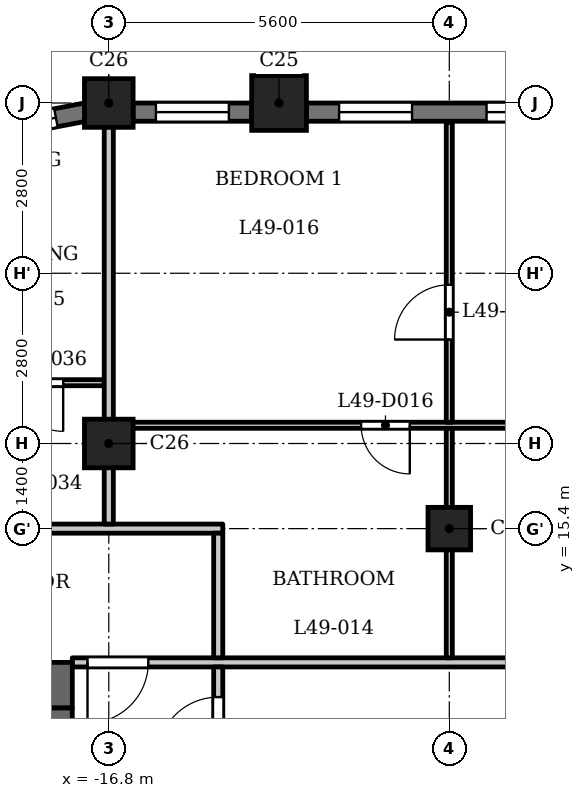
"""IFC4 building model, lengths in metres.
Left out: names, types, materials, properties, quantities, classifications, styles, units other than length and angle.
Written with IfcOpenShell. Run it as: python <this file> out.ifc"""

import sys

from ifc_helpers import new_model, si_unit, direction, frame, frame_2d, origin, origin_2d, place, context, subcontext, project, spatial, rectangle, extrude, element, fill, save


model = new_model("IFC4")
c1 = context("Model", 3, precision=1e-05, world=origin(), true_north=direction((0.0, 1.0)))
c2 = subcontext(c1, "Body", "Model", "MODEL_VIEW")
j1 = project(units=[si_unit("LENGTHUNIT", "METRE"), si_unit("PLANEANGLEUNIT", "RADIAN")], contexts=[c1])
p1 = place(None, origin())
s1 = spatial("IfcSite", under=j1, at=p1, CompositionType="ELEMENT")
p2 = place(p1, origin())
s2 = spatial("IfcBuilding", under=s1, at=p2, CompositionType="ELEMENT")
p3 = place(p2, frame((0.0, 0.0, 192.4)))
s3 = spatial("IfcBuildingStorey", under=s2, at=p3, CompositionType="ELEMENT", Elevation=192.4)
p4 = place(p3, frame((-14.0, 22.4, 0.0), z_axis=(0.0, 0.0, 1.0), x_axis=(1.0, 0.0, 0.0)))
e1 = element("IfcColumn", 1, at=p4, inside=s3, PredefinedType="COLUMN", context=c2, shape_type="SweptSolid", body=[
    extrude(rectangle(XDim=0.9, YDim=0.9, at=origin_2d()), origin(), (0.0, 0.0, 1.0), 3.5),
])
for number, where, z_axis, x_axis in (
    (2, (-16.8, 16.8, 0.0), (0.0, 0.0, 1.0), (1.0, 0.0, 0.0)),
    (3, (-16.8, 22.4, 0.0), (0.0, 0.0, 1.0), (1.0, 0.0, 0.0)),
):
    element("IfcColumn", number, at=place(p3, frame(where, z_axis=z_axis, x_axis=x_axis)), inside=s3, PredefinedType="COLUMN", context=c2, shape_type="SweptSolid", body=[
        extrude(rectangle(XDim=0.8, YDim=0.8, at=origin_2d()), origin(), (0.0, 0.0, 1.0), 3.5),
    ])
p5 = place(p3, frame((-11.2, 15.4, 0.0), z_axis=(0.0, 0.0, 1.0), x_axis=(1.0, 0.0, 0.0)))
e4 = element("IfcColumn", 4, at=p5, inside=s3, PredefinedType="COLUMN", context=c2, shape_type="SweptSolid", body=[
    extrude(rectangle(XDim=0.7, YDim=0.7, at=origin_2d()), origin(), (0.0, 0.0, 1.0), 3.5),
])
p6 = place(p3, frame((-8.85, 22.25, 0.0), z_axis=(0.0, 0.0, 1.0), x_axis=(-1.0, 0.0, 0.0)))
e5 = element("IfcWall", 5, at=p6, inside=s3, PredefinedType="SOLIDWALL", context=c2, shape_type="SweptSolid", body=[
    extrude(rectangle(XDim=4.7, YDim=0.3, at=frame_2d((2.35, 0.0))), origin(), (0.0, 0.0, 1.0), 2.5),
])
p7 = place(p6, frame((0.538, 0.0, 0.6)))
e6 = element("IfcOpeningElement", 6, at=p7, cuts=e5, PredefinedType="OPENING", context=c2, shape_type="SweptSolid", body=[
    extrude(rectangle(XDim=1.2, YDim=1.55, at=frame_2d((0.6, 0.775))), frame((0.0, 0.16, 0.0), z_axis=(0.0, -1.0, 0.0), x_axis=(1.0, 0.0, 0.0)), (0.0, 0.0, 1.0), 0.32),
])
p8 = place(p6, frame((2.962, 0.0, 0.6)))
e7 = element("IfcOpeningElement", 7, at=p8, cuts=e5, PredefinedType="OPENING", context=c2, shape_type="SweptSolid", body=[
    extrude(rectangle(XDim=1.2, YDim=1.55, at=frame_2d((0.6, 0.775))), frame((0.0, 0.16, 0.0), z_axis=(0.0, -1.0, 0.0), x_axis=(1.0, 0.0, 0.0)), (0.0, 0.0, 1.0), 0.32),
])
p9 = place(p3, frame((-14.45, 22.25, 0.0), z_axis=(0.0, 0.0, 1.0), x_axis=(-1.0, 0.0, 0.0)))
e8 = element("IfcWall", 8, at=p9, inside=s3, PredefinedType="SOLIDWALL", context=c2, shape_type="SweptSolid", body=[
    extrude(rectangle(XDim=1.95, YDim=0.3, at=frame_2d((0.975, 0.0))), origin(), (0.0, 0.0, 1.0), 2.5),
])
p10 = place(p9, frame((0.375, 0.0, 0.6)))
e9 = element("IfcOpeningElement", 9, at=p10, cuts=e8, PredefinedType="OPENING", context=c2, shape_type="SweptSolid", body=[
    extrude(rectangle(XDim=1.2, YDim=1.55, at=frame_2d((0.6, 0.775))), frame((0.0, 0.16, 0.0), z_axis=(0.0, -1.0, 0.0), x_axis=(1.0, 0.0, 0.0)), (0.0, 0.0, 1.0), 0.32),
])
p11 = place(p3, frame((-17.179, 22.251, 0.0), z_axis=(0.0, 0.0, 1.0), x_axis=(-0.98230529033, -0.187286722942, 0.0)))
e10 = element("IfcWall", 10, at=p11, inside=s3, PredefinedType="SOLIDWALL", context=c2, shape_type="SweptSolid", body=[
    extrude(rectangle(XDim=1.799, YDim=0.3, at=frame_2d((0.899, 0.0))), origin(), (0.0, 0.0, 1.0), 2.5),
])
p12 = place(p11, frame((0.5, 0.0, 0.6)))
e11 = element("IfcOpeningElement", 11, at=p12, cuts=e10, PredefinedType="OPENING", context=c2, shape_type="SweptSolid", body=[
    extrude(rectangle(XDim=0.8, YDim=1.55, at=frame_2d((0.4, 0.775))), frame((0.0, 0.16, 0.0), z_axis=(0.0, -1.0, 0.0), x_axis=(1.0, 0.0, 0.0)), (0.0, 0.0, 1.0), 0.32),
])
p13 = place(p3, frame((-17.4, 12.825, 0.0), z_axis=(0.0, 0.0, 1.0), x_axis=(-1.0, 0.0, 0.0)))
e12 = element("IfcWall", 12, at=p13, inside=s3, PredefinedType="SHEAR", context=c2, shape_type="SweptSolid", body=[
    extrude(rectangle(XDim=7.6, YDim=0.75, at=frame_2d((3.8, 0.0))), origin(), (0.0, 0.0, 1.0), 3.2),
])
p14 = place(p3, frame((-17.6, -12.45, 0.0), z_axis=(0.0, 0.0, 1.0), x_axis=(0.0, 1.0, 0.0)))
e13 = element("IfcWall", 13, at=p14, inside=s3, PredefinedType="SHEAR", context=c2, shape_type="SweptSolid", body=[
    extrude(rectangle(XDim=24.9, YDim=0.4, at=frame_2d((12.45, 0.0))), origin(), (0.0, 0.0, 1.0), 3.2),
])
p15 = place(p14, frame((6.325, 0.0, 0.0)))
e14 = element("IfcOpeningElement", 14, at=p15, cuts=e13, PredefinedType="OPENING", context=c2, shape_type="SweptSolid", body=[
    extrude(rectangle(XDim=0.9, YDim=2.1, at=frame_2d((0.45, 1.05))), frame((0.0, 0.21, 0.0), z_axis=(0.0, -1.0, 0.0), x_axis=(1.0, 0.0, 0.0)), (0.0, 0.0, 1.0), 0.42),
])
p16 = place(p14, frame((9.925, 0.0, 0.0)))
e15 = element("IfcOpeningElement", 15, at=p16, cuts=e13, PredefinedType="OPENING", context=c2, shape_type="SweptSolid", body=[
    extrude(rectangle(XDim=0.9, YDim=2.1, at=frame_2d((0.45, 1.05))), frame((0.0, 0.21, 0.0), z_axis=(0.0, -1.0, 0.0), x_axis=(1.0, 0.0, 0.0)), (0.0, 0.0, 1.0), 0.42),
])
p17 = place(p14, frame((15.6, 0.0, 0.0)))
e16 = element("IfcOpeningElement", 16, at=p17, cuts=e13, PredefinedType="OPENING", context=c2, shape_type="SweptSolid", body=[
    extrude(rectangle(XDim=1.1, YDim=2.1, at=frame_2d((0.55, 1.05))), frame((0.0, 0.21, 0.0), z_axis=(0.0, -1.0, 0.0), x_axis=(1.0, 0.0, 0.0)), (0.0, 0.0, 1.0), 0.42),
])
p18 = place(p14, frame((18.0, 0.0, 0.0)))
e17 = element("IfcOpeningElement", 17, at=p18, cuts=e13, PredefinedType="OPENING", context=c2, shape_type="SweptSolid", body=[
    extrude(rectangle(XDim=1.1, YDim=2.1, at=frame_2d((0.55, 1.05))), frame((0.0, 0.21, 0.0), z_axis=(0.0, -1.0, 0.0), x_axis=(1.0, 0.0, 0.0)), (0.0, 0.0, 1.0), 0.42),
])
p19 = place(p14, frame((23.025, 0.0, 0.0)))
e18 = element("IfcOpeningElement", 18, at=p19, cuts=e13, PredefinedType="OPENING", context=c2, shape_type="SweptSolid", body=[
    extrude(rectangle(XDim=1.1, YDim=2.1, at=frame_2d((0.55, 1.05))), frame((0.0, 0.21, 0.0), z_axis=(0.0, -1.0, 0.0), x_axis=(1.0, 0.0, 0.0)), (0.0, 0.0, 1.0), 0.42),
])
p20 = place(p14, frame((0.775, 0.0, 0.0)))
e19 = element("IfcOpeningElement", 19, at=p20, cuts=e13, PredefinedType="OPENING", context=c2, shape_type="SweptSolid", body=[
    extrude(rectangle(XDim=1.1, YDim=2.1, at=frame_2d((0.55, 1.05))), frame((0.0, 0.21, 0.0), z_axis=(0.0, -1.0, 0.0), x_axis=(1.0, 0.0, 0.0)), (0.0, 0.0, 1.0), 0.42),
])
p21 = place(p14, frame((12.925, 0.0, 0.0)))
e20 = element("IfcOpeningElement", 20, at=p21, cuts=e13, PredefinedType="OPENING", context=c2, shape_type="SweptSolid", body=[
    extrude(rectangle(XDim=1.8, YDim=2.1, at=frame_2d((0.9, 1.05))), frame((0.0, 0.21, 0.0), z_axis=(0.0, -1.0, 0.0), x_axis=(1.0, 0.0, 0.0)), (0.0, 0.0, 1.0), 0.42),
])
p22 = place(p3, frame((-17.4, 13.2, 0.0), z_axis=(0.0, 0.0, 1.0), x_axis=(1.0, 0.0, 0.0)))
e21 = element("IfcWall", 21, at=p22, inside=s3, PredefinedType="PARTITIONING", context=c2, shape_type="SweptSolid", body=[
    extrude(rectangle(XDim=34.8, YDim=0.15, at=frame_2d((17.4, 0.0))), origin(), (0.0, 0.0, 1.0), 3.2),
])
p23 = place(p22, frame((0.25, 0.0, 0.0)))
e22 = element("IfcOpeningElement", 22, at=p23, cuts=e21, PredefinedType="OPENING", context=c2, shape_type="SweptSolid", body=[
    extrude(rectangle(XDim=1.0, YDim=2.1, at=frame_2d((0.5, 1.05))), frame((0.0, 0.085, 0.0), z_axis=(0.0, -1.0, 0.0), x_axis=(1.0, 0.0, 0.0)), (0.0, 0.0, 1.0), 0.17),
])
p24 = place(p22, frame((33.65, 0.0, 0.0)))
e23 = element("IfcOpeningElement", 23, at=p24, cuts=e21, PredefinedType="OPENING", context=c2, shape_type="SweptSolid", body=[
    extrude(rectangle(XDim=1.0, YDim=2.1, at=frame_2d((0.5, 1.05))), frame((0.0, 0.085, 0.0), z_axis=(0.0, -1.0, 0.0), x_axis=(1.0, 0.0, 0.0)), (0.0, 0.0, 1.0), 0.17),
])
p25 = place(p22, frame((10.15, 0.0, 0.0)))
e24 = element("IfcOpeningElement", 24, at=p25, cuts=e21, PredefinedType="OPENING", context=c2, shape_type="SweptSolid", body=[
    extrude(rectangle(XDim=1.0, YDim=2.1, at=frame_2d((0.5, 1.05))), frame((0.0, 0.085, 0.0), z_axis=(0.0, -1.0, 0.0), x_axis=(1.0, 0.0, 0.0)), (0.0, 0.0, 1.0), 0.17),
])
p26 = place(p22, frame((13.55, 0.0, 0.0)))
e25 = element("IfcOpeningElement", 25, at=p26, cuts=e21, PredefinedType="OPENING", context=c2, shape_type="SweptSolid", body=[
    extrude(rectangle(XDim=1.0, YDim=2.1, at=frame_2d((0.5, 1.05))), frame((0.0, 0.085, 0.0), z_axis=(0.0, -1.0, 0.0), x_axis=(1.0, 0.0, 0.0)), (0.0, 0.0, 1.0), 0.17),
])
p27 = place(p22, frame((20.85, 0.0, 0.0)))
e26 = element("IfcOpeningElement", 26, at=p27, cuts=e21, PredefinedType="OPENING", context=c2, shape_type="SweptSolid", body=[
    extrude(rectangle(XDim=1.0, YDim=2.1, at=frame_2d((0.5, 1.05))), frame((0.0, 0.085, 0.0), z_axis=(0.0, -1.0, 0.0), x_axis=(1.0, 0.0, 0.0)), (0.0, 0.0, 1.0), 0.17),
])
p28 = place(p22, frame((23.7, 0.0, 0.0)))
e27 = element("IfcOpeningElement", 27, at=p28, cuts=e21, PredefinedType="OPENING", context=c2, shape_type="SweptSolid", body=[
    extrude(rectangle(XDim=1.0, YDim=2.1, at=frame_2d((0.5, 1.05))), frame((0.0, 0.085, 0.0), z_axis=(0.0, -1.0, 0.0), x_axis=(1.0, 0.0, 0.0)), (0.0, 0.0, 1.0), 0.17),
])
p29 = place(p3, frame((-24.684, 15.4, 0.0), z_axis=(0.0, 0.0, 1.0), x_axis=(1.0, 0.0, 0.0)))
e28 = element("IfcWall", 28, at=p29, inside=s3, PredefinedType="PARTITIONING", context=c2, shape_type="SweptSolid", body=[
    extrude(rectangle(XDim=9.759, YDim=0.15, at=frame_2d((4.879, 0.0))), origin(), (0.0, 0.0, 1.0), 3.2),
])
p30 = place(p29, frame((4.034, 0.0, 0.0)))
e29 = element("IfcOpeningElement", 29, at=p30, cuts=e28, PredefinedType="OPENING", context=c2, shape_type="SweptSolid", body=[
    extrude(rectangle(XDim=1.0, YDim=2.1, at=frame_2d((0.5, 1.05))), frame((0.0, 0.085, 0.0), z_axis=(0.0, -1.0, 0.0), x_axis=(1.0, 0.0, 0.0)), (0.0, 0.0, 1.0), 0.17),
])
p31 = place(p3, frame((-16.725, 17.1, 0.0), z_axis=(0.0, 0.0, 1.0), x_axis=(1.0, 0.0, 0.0)))
e30 = element("IfcWall", 30, at=p31, inside=s3, PredefinedType="PARTITIONING", context=c2, shape_type="SweptSolid", body=[
    extrude(rectangle(XDim=33.45, YDim=0.1, at=frame_2d((16.725, 0.0))), origin(), (0.0, 0.0, 1.0), 3.2),
])
p32 = place(p31, frame((4.075, 0.0, 0.0)))
e31 = element("IfcOpeningElement", 31, at=p32, cuts=e30, PredefinedType="OPENING", context=c2, shape_type="SweptSolid", body=[
    extrude(rectangle(XDim=0.8, YDim=2.1, at=frame_2d((0.4, 1.05))), frame((0.0, 0.06, 0.0), z_axis=(0.0, -1.0, 0.0), x_axis=(1.0, 0.0, 0.0)), (0.0, 0.0, 1.0), 0.12),
])
p33 = place(p31, frame((9.575, 0.0, 0.0)))
e32 = element("IfcOpeningElement", 32, at=p33, cuts=e30, PredefinedType="OPENING", context=c2, shape_type="SweptSolid", body=[
    extrude(rectangle(XDim=0.9, YDim=2.1, at=frame_2d((0.45, 1.05))), frame((0.0, 0.06, 0.0), z_axis=(0.0, -1.0, 0.0), x_axis=(1.0, 0.0, 0.0)), (0.0, 0.0, 1.0), 0.12),
])
p34 = place(p31, frame((15.175, 0.0, 0.0)))
e33 = element("IfcOpeningElement", 33, at=p34, cuts=e30, PredefinedType="OPENING", context=c2, shape_type="SweptSolid", body=[
    extrude(rectangle(XDim=0.8, YDim=2.1, at=frame_2d((0.4, 1.05))), frame((0.0, 0.06, 0.0), z_axis=(0.0, -1.0, 0.0), x_axis=(1.0, 0.0, 0.0)), (0.0, 0.0, 1.0), 0.12),
])
p35 = place(p31, frame((12.975, 0.0, 0.0)))
e34 = element("IfcOpeningElement", 34, at=p35, cuts=e30, PredefinedType="OPENING", context=c2, shape_type="SweptSolid", body=[
    extrude(rectangle(XDim=0.9, YDim=2.1, at=frame_2d((0.45, 1.05))), frame((0.0, 0.06, 0.0), z_axis=(0.0, -1.0, 0.0), x_axis=(1.0, 0.0, 0.0)), (0.0, 0.0, 1.0), 0.12),
])
p36 = place(p31, frame((17.625, 0.0, 0.0)))
e35 = element("IfcOpeningElement", 35, at=p36, cuts=e30, PredefinedType="OPENING", context=c2, shape_type="SweptSolid", body=[
    extrude(rectangle(XDim=0.8, YDim=2.1, at=frame_2d((0.4, 1.05))), frame((0.0, 0.06, 0.0), z_axis=(0.0, -1.0, 0.0), x_axis=(1.0, 0.0, 0.0)), (0.0, 0.0, 1.0), 0.12),
])
p37 = place(p31, frame((20.025, 0.0, 0.0)))
e36 = element("IfcOpeningElement", 36, at=p37, cuts=e30, PredefinedType="OPENING", context=c2, shape_type="SweptSolid", body=[
    extrude(rectangle(XDim=0.9, YDim=2.1, at=frame_2d((0.45, 1.05))), frame((0.0, 0.06, 0.0), z_axis=(0.0, -1.0, 0.0), x_axis=(1.0, 0.0, 0.0)), (0.0, 0.0, 1.0), 0.12),
])
p38 = place(p31, frame((31.975, 0.0, 0.0)))
e37 = element("IfcOpeningElement", 37, at=p38, cuts=e30, PredefinedType="OPENING", context=c2, shape_type="SweptSolid", body=[
    extrude(rectangle(XDim=0.8, YDim=2.1, at=frame_2d((0.4, 1.05))), frame((0.0, 0.06, 0.0), z_axis=(0.0, -1.0, 0.0), x_axis=(1.0, 0.0, 0.0)), (0.0, 0.0, 1.0), 0.12),
])
p39 = place(p31, frame((29.775, 0.0, 0.0)))
e38 = element("IfcOpeningElement", 38, at=p39, cuts=e30, PredefinedType="OPENING", context=c2, shape_type="SweptSolid", body=[
    extrude(rectangle(XDim=0.9, YDim=2.1, at=frame_2d((0.45, 1.05))), frame((0.0, 0.06, 0.0), z_axis=(0.0, -1.0, 0.0), x_axis=(1.0, 0.0, 0.0)), (0.0, 0.0, 1.0), 0.12),
])
p40 = place(p31, frame((23.025, 0.0, 0.0)))
e39 = element("IfcOpeningElement", 39, at=p40, cuts=e30, PredefinedType="OPENING", context=c2, shape_type="SweptSolid", body=[
    extrude(rectangle(XDim=0.9, YDim=2.1, at=frame_2d((0.45, 1.05))), frame((0.0, 0.06, 0.0), z_axis=(0.0, -1.0, 0.0), x_axis=(1.0, 0.0, 0.0)), (0.0, 0.0, 1.0), 0.12),
])
p41 = place(p31, frame((26.125, 0.0, 0.0)))
e40 = element("IfcOpeningElement", 40, at=p41, cuts=e30, PredefinedType="OPENING", context=c2, shape_type="SweptSolid", body=[
    extrude(rectangle(XDim=0.9, YDim=2.1, at=frame_2d((0.45, 1.05))), frame((0.0, 0.06, 0.0), z_axis=(0.0, -1.0, 0.0), x_axis=(1.0, 0.0, 0.0)), (0.0, 0.0, 1.0), 0.12),
])
p42 = place(p3, frame((-23.594, 17.8, 0.0), z_axis=(0.0, 0.0, 1.0), x_axis=(1.0, 0.0, 0.0)))
e41 = element("IfcWall", 41, at=p42, inside=s3, PredefinedType="PARTITIONING", context=c2, shape_type="SweptSolid", body=[
    extrude(rectangle(XDim=6.719, YDim=0.1, at=frame_2d((3.359, 0.0))), origin(), (0.0, 0.0, 1.0), 3.2),
])
p43 = place(p42, frame((5.244, 0.0, 0.0)))
e42 = element("IfcOpeningElement", 42, at=p43, cuts=e41, PredefinedType="OPENING", context=c2, shape_type="SweptSolid", body=[
    extrude(rectangle(XDim=0.8, YDim=2.1, at=frame_2d((0.4, 1.05))), frame((0.0, 0.06, 0.0), z_axis=(0.0, -1.0, 0.0), x_axis=(1.0, 0.0, 0.0)), (0.0, 0.0, 1.0), 0.12),
])
p44 = place(p42, frame((2.044, 0.0, 0.0)))
e43 = element("IfcOpeningElement", 43, at=p44, cuts=e41, PredefinedType="OPENING", context=c2, shape_type="SweptSolid", body=[
    extrude(rectangle(XDim=0.9, YDim=2.1, at=frame_2d((0.45, 1.05))), frame((0.0, 0.06, 0.0), z_axis=(0.0, -1.0, 0.0), x_axis=(1.0, 0.0, 0.0)), (0.0, 0.0, 1.0), 0.12),
])
p45 = place(p3, frame((-16.8, 15.475, 0.0), z_axis=(0.0, 0.0, 1.0), x_axis=(0.0, 1.0, 0.0)))
e44 = element("IfcWall", 44, at=p45, inside=s3, PredefinedType="PARTITIONING", context=c2, shape_type="SweptSolid", body=[
    extrude(rectangle(XDim=6.835, YDim=0.15, at=frame_2d((3.417, 0.0))), origin(), (0.0, 0.0, 1.0), 2.55),
])
p46 = place(p3, frame((-15.0, 6.769, 0.0), z_axis=(0.0, 0.0, 1.0), x_axis=(0.0, 1.0, 0.0)))
e45 = element("IfcWall", 45, at=p46, inside=s3, PredefinedType="PARTITIONING", context=c2, shape_type="SweptSolid", body=[
    extrude(rectangle(XDim=6.356, YDim=0.15, at=frame_2d((3.178, 0.0))), origin(), (0.0, 0.0, 1.0), 3.2),
])
p47 = place(p46, frame((4.86, 0.0, 0.0)))
e46 = element("IfcOpeningElement", 46, at=p47, cuts=e45, PredefinedType="OPENING", context=c2, shape_type="SweptSolid", body=[
    extrude(rectangle(XDim=1.0, YDim=2.1, at=frame_2d((0.5, 1.05))), frame((0.0, 0.085, 0.0), z_axis=(0.0, -1.0, 0.0), x_axis=(1.0, 0.0, 0.0)), (0.0, 0.0, 1.0), 0.17),
])
p48 = place(p3, frame((-15.0, 13.275, 0.0), z_axis=(0.0, 0.0, 1.0), x_axis=(0.0, 1.0, 0.0)))
e47 = element("IfcWall", 47, at=p48, inside=s3, PredefinedType="PARTITIONING", context=c2, shape_type="SweptSolid", body=[
    extrude(rectangle(XDim=2.05, YDim=0.15, at=frame_2d((1.025, 0.0))), origin(), (0.0, 0.0, 1.0), 3.2),
])
p49 = place(p3, frame((-11.2, 13.275, 0.0), z_axis=(0.0, 0.0, 1.0), x_axis=(0.0, 1.0, 0.0)))
e48 = element("IfcWall", 48, at=p49, inside=s3, PredefinedType="PARTITIONING", context=c2, shape_type="SweptSolid", body=[
    extrude(rectangle(XDim=3.775, YDim=0.1, at=frame_2d((1.888, 0.0))), origin(), (0.0, 0.0, 1.0), 3.2),
])
p50 = place(p3, frame((-11.2, 17.15, 0.0), z_axis=(0.0, 0.0, 1.0), x_axis=(0.0, 1.0, 0.0)))
e49 = element("IfcWall", 49, at=p50, inside=s3, PredefinedType="PARTITIONING", context=c2, shape_type="SweptSolid", body=[
    extrude(rectangle(XDim=4.93, YDim=0.1, at=frame_2d((2.465, 0.0))), origin(), (0.0, 0.0, 1.0), 3.2),
])
p51 = place(p50, frame((1.36, 0.0, 0.0)))
e50 = element("IfcOpeningElement", 50, at=p51, cuts=e49, PredefinedType="OPENING", context=c2, shape_type="SweptSolid", body=[
    extrude(rectangle(XDim=0.9, YDim=2.1, at=frame_2d((0.45, 1.05))), frame((0.0, 0.06, 0.0), z_axis=(0.0, -1.0, 0.0), x_axis=(1.0, 0.0, 0.0)), (0.0, 0.0, 1.0), 0.12),
])
p52 = place(p47, origin())
e51 = element("IfcDoor", 51, at=p52, inside=s3, OperationType="SINGLE_SWING_RIGHT", PredefinedType="DOOR", context=c2, shape_type="SweptSolid", body=[
    extrude(rectangle(XDim=1.0, YDim=2.1, at=frame_2d((0.5, 1.05))), frame((0.0, 0.025, 0.0), z_axis=(0.0, -1.0, 0.0), x_axis=(1.0, 0.0, 0.0)), (0.0, 0.0, 1.0), 0.05),
])
fill(e46, e51)
p53 = place(p23, origin())
e52 = element("IfcDoor", 52, at=p53, inside=s3, OperationType="SINGLE_SWING_LEFT", PredefinedType="DOOR", context=c2, shape_type="SweptSolid", body=[
    extrude(rectangle(XDim=1.0, YDim=2.1, at=frame_2d((0.5, 1.05))), frame((0.0, 0.025, 0.0), z_axis=(0.0, -1.0, 0.0), x_axis=(1.0, 0.0, 0.0)), (0.0, 0.0, 1.0), 0.05),
])
fill(e22, e52)
p54 = place(p32, origin())
e53 = element("IfcDoor", 53, at=p54, inside=s3, OperationType="SINGLE_SWING_RIGHT", PredefinedType="DOOR", context=c2, shape_type="SweptSolid", body=[
    extrude(rectangle(XDim=0.8, YDim=2.1, at=frame_2d((0.4, 1.05))), frame((0.0, 0.025, 0.0), z_axis=(0.0, -1.0, 0.0), x_axis=(1.0, 0.0, 0.0)), (0.0, 0.0, 1.0), 0.05),
])
fill(e31, e53)
p55 = place(p51, origin())
e54 = element("IfcDoor", 54, at=p55, inside=s3, OperationType="SINGLE_SWING_RIGHT", PredefinedType="DOOR", context=c2, shape_type="SweptSolid", body=[
    extrude(rectangle(XDim=0.9, YDim=2.1, at=frame_2d((0.45, 1.05))), frame((0.0, 0.025, 0.0), z_axis=(0.0, -1.0, 0.0), x_axis=(1.0, 0.0, 0.0)), (0.0, 0.0, 1.0), 0.05),
])
fill(e50, e54)
p56 = place(p43, origin())
e55 = element("IfcDoor", 55, at=p56, inside=s3, OperationType="SINGLE_SWING_RIGHT", PredefinedType="DOOR", context=c2, shape_type="SweptSolid", body=[
    extrude(rectangle(XDim=0.8, YDim=2.1, at=frame_2d((0.4, 1.05))), frame((0.0, 0.025, 0.0), z_axis=(0.0, -1.0, 0.0), x_axis=(1.0, 0.0, 0.0)), (0.0, 0.0, 1.0), 0.05),
])
fill(e42, e55)
p57 = place(p7, origin())
e56 = element("IfcWindow", 56, at=p57, inside=s3, PartitioningType="SINGLE_PANEL", PredefinedType="WINDOW", context=c2, shape_type="SweptSolid", body=[
    extrude(rectangle(XDim=1.2, YDim=1.55, at=frame_2d((0.6, 0.775))), frame((0.0, 0.03, 0.0), z_axis=(0.0, -1.0, 0.0), x_axis=(1.0, 0.0, 0.0)), (0.0, 0.0, 1.0), 0.06),
])
fill(e6, e56)
p58 = place(p8, origin())
e57 = element("IfcWindow", 57, at=p58, inside=s3, PartitioningType="SINGLE_PANEL", PredefinedType="WINDOW", context=c2, shape_type="SweptSolid", body=[
    extrude(rectangle(XDim=1.2, YDim=1.55, at=frame_2d((0.6, 0.775))), frame((0.0, 0.03, 0.0), z_axis=(0.0, -1.0, 0.0), x_axis=(1.0, 0.0, 0.0)), (0.0, 0.0, 1.0), 0.06),
])
fill(e7, e57)
p59 = place(p10, origin())
e58 = element("IfcWindow", 58, at=p59, inside=s3, PartitioningType="SINGLE_PANEL", PredefinedType="WINDOW", context=c2, shape_type="SweptSolid", body=[
    extrude(rectangle(XDim=1.2, YDim=1.55, at=frame_2d((0.6, 0.775))), frame((0.0, 0.03, 0.0), z_axis=(0.0, -1.0, 0.0), x_axis=(1.0, 0.0, 0.0)), (0.0, 0.0, 1.0), 0.06),
])
fill(e9, e58)
p60 = place(p12, origin())
e59 = element("IfcWindow", 59, at=p60, inside=s3, PartitioningType="SINGLE_PANEL", PredefinedType="WINDOW", context=c2, shape_type="SweptSolid", body=[
    extrude(rectangle(XDim=0.8, YDim=1.55, at=frame_2d((0.4, 0.775))), frame((0.0, 0.03, 0.0), z_axis=(0.0, -1.0, 0.0), x_axis=(1.0, 0.0, 0.0)), (0.0, 0.0, 1.0), 0.06),
])
fill(e11, e59)
save(model, sys.argv[1])
